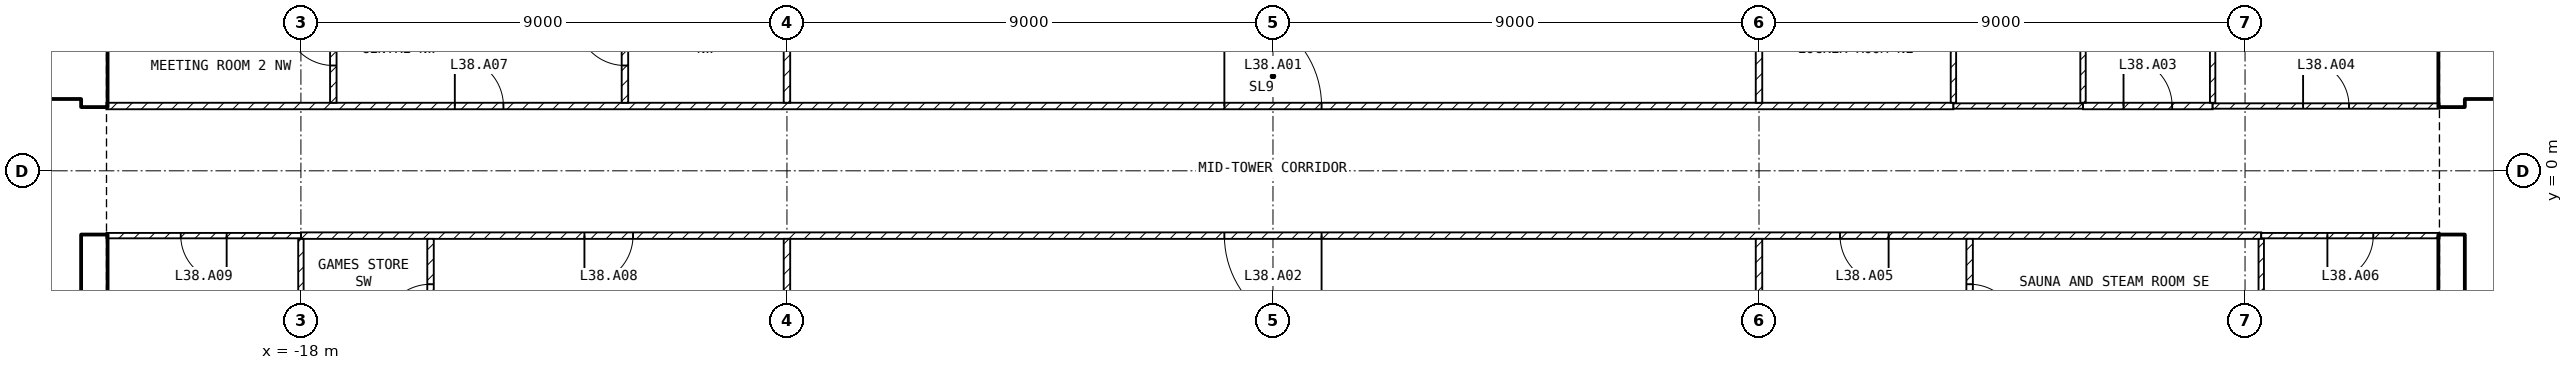
"""IFC4 building model, lengths in metres.
Left out: names, types, materials, properties, quantities, classifications, styles, units other than length and angle.
Written with IfcOpenShell. Run it as: python <this file> out.ifc"""

import sys

from ifc_helpers import new_model, si_unit, direction, frame, frame_2d, origin, place, context, subcontext, project, spatial, rectangle, extrude, element, fill, save


model = new_model("IFC4")
c1 = context("Model", 3, precision=1e-05, world=origin(), true_north=direction((0.0, 1.0)))
c2 = subcontext(c1, "Body", "Model", "MODEL_VIEW")
j1 = project(units=[si_unit("LENGTHUNIT", "METRE"), si_unit("PLANEANGLEUNIT", "RADIAN")], contexts=[c1])
p1 = place(None, origin())
s1 = spatial("IfcSite", under=j1, at=p1, CompositionType="ELEMENT")
p2 = place(p1, origin())
s2 = spatial("IfcBuilding", under=s1, at=p2, CompositionType="ELEMENT")
p3 = place(p2, frame((0.0, 0.0, 154.9)))
s3 = spatial("IfcBuildingStorey", under=s2, at=p3, CompositionType="ELEMENT", Elevation=154.9)
for number, where, z_axis, x_axis in (
    (1, (21.825, -8.1, 0.0), (0.0, 0.0, 1.0), (0.0, 1.0, 0.0)),
    (2, (21.825, 1.2, 0.0), (0.0, 0.0, 1.0), (0.0, 1.0, 0.0)),
):
    element("IfcWall", number, at=place(p3, frame(where, z_axis=z_axis, x_axis=x_axis)), inside=s3, PredefinedType="SHEAR", context=c2, shape_type="SweptSolid", body=[
        extrude(rectangle(XDim=6.9, YDim=0.45, at=frame_2d((3.45, 0.0))), origin(), (0.0, 0.0, 1.0), 6.75),
    ])
p4 = place(p3, frame((22.05, 1.45, 0.0), z_axis=(0.0, 0.0, 1.0), x_axis=(1.0, 0.0, 0.0)))
e3 = element("IfcWall", 3, at=p4, inside=s3, PredefinedType="SOLIDWALL", context=c2, shape_type="SweptSolid", body=[
    extrude(rectangle(XDim=11.0, YDim=0.2, at=frame_2d((5.5, 0.0))), origin(), (0.0, 0.0, 1.0), 6.75),
])
p5 = place(p4, frame((0.75, 0.0, 0.0)))
e4 = element("IfcOpeningElement", 4, at=p5, cuts=e3, PredefinedType="OPENING", context=c2, shape_type="SweptSolid", body=[
    extrude(rectangle(XDim=1.0, YDim=2.1, at=frame_2d((0.5, 1.05))), frame((0.0, 0.11, 0.0), z_axis=(0.0, -1.0, 0.0), x_axis=(1.0, 0.0, 0.0)), (0.0, 0.0, 1.0), 0.22),
])
p6 = place(p4, frame((3.25, 0.0, 0.0)))
e5 = element("IfcOpeningElement", 5, at=p6, cuts=e3, PredefinedType="OPENING", context=c2, shape_type="SweptSolid", body=[
    extrude(rectangle(XDim=1.0, YDim=2.1, at=frame_2d((0.5, 1.05))), frame((0.0, 0.11, 0.0), z_axis=(0.0, -1.0, 0.0), x_axis=(1.0, 0.0, 0.0)), (0.0, 0.0, 1.0), 0.22),
])
p7 = place(p4, frame((9.075, 0.0, 0.0)))
e6 = element("IfcOpeningElement", 6, at=p7, cuts=e3, PredefinedType="OPENING", context=c2, shape_type="SweptSolid", body=[
    extrude(rectangle(XDim=0.9, YDim=2.1, at=frame_2d((0.45, 1.05))), frame((0.0, 0.11, 0.0), z_axis=(0.0, -1.0, 0.0), x_axis=(1.0, 0.0, 0.0)), (0.0, 0.0, 1.0), 0.22),
])
for number, where, z_axis, x_axis in (
    (7, (-21.825, -8.1, 0.0), (0.0, 0.0, 1.0), (0.0, 1.0, 0.0)),
    (8, (-21.825, 1.2, 0.0), (0.0, 0.0, 1.0), (0.0, 1.0, 0.0)),
):
    element("IfcWall", number, at=place(p3, frame(where, z_axis=z_axis, x_axis=x_axis)), inside=s3, PredefinedType="SHEAR", context=c2, shape_type="SweptSolid", body=[
        extrude(rectangle(XDim=6.9, YDim=0.45, at=frame_2d((3.45, 0.0))), origin(), (0.0, 0.0, 1.0), 6.75),
    ])
p8 = place(p3, frame((-33.05, 1.45, 0.0), z_axis=(0.0, 0.0, 1.0), x_axis=(1.0, 0.0, 0.0)))
e9 = element("IfcWall", 9, at=p8, inside=s3, PredefinedType="SOLIDWALL", context=c2, shape_type="SweptSolid", body=[
    extrude(rectangle(XDim=11.0, YDim=0.2, at=frame_2d((5.5, 0.0))), origin(), (0.0, 0.0, 1.0), 6.75),
])
p9 = place(p8, frame((9.25, 0.0, 0.0)))
e10 = element("IfcOpeningElement", 10, at=p9, cuts=e9, PredefinedType="OPENING", context=c2, shape_type="SweptSolid", body=[
    extrude(rectangle(XDim=1.0, YDim=2.1, at=frame_2d((0.5, 1.05))), frame((0.0, 0.11, 0.0), z_axis=(0.0, -1.0, 0.0), x_axis=(1.0, 0.0, 0.0)), (0.0, 0.0, 1.0), 0.22),
])
p10 = place(p8, frame((6.75, 0.0, 0.0)))
e11 = element("IfcOpeningElement", 11, at=p10, cuts=e9, PredefinedType="OPENING", context=c2, shape_type="SweptSolid", body=[
    extrude(rectangle(XDim=1.0, YDim=2.1, at=frame_2d((0.5, 1.05))), frame((0.0, 0.11, 0.0), z_axis=(0.0, -1.0, 0.0), x_axis=(1.0, 0.0, 0.0)), (0.0, 0.0, 1.0), 0.22),
])
p11 = place(p8, frame((1.025, 0.0, 0.0)))
e12 = element("IfcOpeningElement", 12, at=p11, cuts=e9, PredefinedType="OPENING", context=c2, shape_type="SweptSolid", body=[
    extrude(rectangle(XDim=0.9, YDim=2.1, at=frame_2d((0.45, 1.05))), frame((0.0, 0.11, 0.0), z_axis=(0.0, -1.0, 0.0), x_axis=(1.0, 0.0, 0.0)), (0.0, 0.0, 1.0), 0.22),
])
p12 = place(p3, frame((-21.6, 1.2, 0.0), z_axis=(0.0, 0.0, 1.0), x_axis=(1.0, 0.0, 0.0)))
e13 = element("IfcWall", 13, at=p12, inside=s3, PredefinedType="PARTITIONING", context=c2, shape_type="SweptSolid", body=[
    extrude(rectangle(XDim=34.2, YDim=0.12, at=frame_2d((17.1, 0.0))), origin(), (0.0, 0.0, 1.0), 6.75),
])
p13 = place(p12, frame((20.7, 0.0, 0.0)))
e14 = element("IfcOpeningElement", 14, at=p13, cuts=e13, PredefinedType="OPENING", context=c2, shape_type="SweptSolid", body=[
    extrude(rectangle(XDim=1.8, YDim=2.1, at=frame_2d((0.9, 1.05))), frame((0.0, 0.07, 0.0), z_axis=(0.0, -1.0, 0.0), x_axis=(1.0, 0.0, 0.0)), (0.0, 0.0, 1.0), 0.14),
])
p14 = place(p12, frame((6.45, 0.0, 0.0)))
e15 = element("IfcOpeningElement", 15, at=p14, cuts=e13, PredefinedType="OPENING", context=c2, shape_type="SweptSolid", body=[
    extrude(rectangle(XDim=0.9, YDim=2.1, at=frame_2d((0.45, 1.05))), frame((0.0, 0.07, 0.0), z_axis=(0.0, -1.0, 0.0), x_axis=(1.0, 0.0, 0.0)), (0.0, 0.0, 1.0), 0.14),
])
p15 = place(p3, frame((18.3, -1.2, 0.0), z_axis=(0.0, 0.0, 1.0), x_axis=(-1.0, 0.0, 0.0)))
e16 = element("IfcWall", 16, at=p15, inside=s3, PredefinedType="PARTITIONING", context=c2, shape_type="SweptSolid", body=[
    extrude(rectangle(XDim=36.3, YDim=0.12, at=frame_2d((18.15, 0.0))), origin(), (0.0, 0.0, 1.0), 6.75),
])
p16 = place(p15, frame((17.4, 0.0, 0.0)))
e17 = element("IfcOpeningElement", 17, at=p16, cuts=e16, PredefinedType="OPENING", context=c2, shape_type="SweptSolid", body=[
    extrude(rectangle(XDim=1.8, YDim=2.1, at=frame_2d((0.9, 1.05))), frame((0.0, 0.07, 0.0), z_axis=(0.0, -1.0, 0.0), x_axis=(1.0, 0.0, 0.0)), (0.0, 0.0, 1.0), 0.14),
])
p17 = place(p15, frame((6.9, 0.0, 0.0)))
e18 = element("IfcOpeningElement", 18, at=p17, cuts=e16, PredefinedType="OPENING", context=c2, shape_type="SweptSolid", body=[
    extrude(rectangle(XDim=0.9, YDim=2.1, at=frame_2d((0.45, 1.05))), frame((0.0, 0.07, 0.0), z_axis=(0.0, -1.0, 0.0), x_axis=(1.0, 0.0, 0.0)), (0.0, 0.0, 1.0), 0.14),
])
p18 = place(p15, frame((30.15, 0.0, 0.0)))
e19 = element("IfcOpeningElement", 19, at=p18, cuts=e16, PredefinedType="OPENING", context=c2, shape_type="SweptSolid", body=[
    extrude(rectangle(XDim=0.9, YDim=2.1, at=frame_2d((0.45, 1.05))), frame((0.0, 0.07, 0.0), z_axis=(0.0, -1.0, 0.0), x_axis=(1.0, 0.0, 0.0)), (0.0, 0.0, 1.0), 0.14),
])
p19 = place(p3, frame((12.6, 1.2, 0.0), z_axis=(0.0, 0.0, 1.0), x_axis=(1.0, 0.0, 0.0)))
e20 = element("IfcWall", 20, at=p19, inside=s3, PredefinedType="PARTITIONING", context=c2, shape_type="SweptSolid", body=[
    extrude(rectangle(XDim=2.4, YDim=0.1, at=frame_2d((1.2, 0.0))), origin(), (0.0, 0.0, 1.0), 6.75),
])
p20 = place(p3, frame((15.0, 1.2, 0.0), z_axis=(0.0, 0.0, 1.0), x_axis=(1.0, 0.0, 0.0)))
e21 = element("IfcWall", 21, at=p20, inside=s3, PredefinedType="PARTITIONING", context=c2, shape_type="SweptSolid", body=[
    extrude(rectangle(XDim=2.4, YDim=0.12, at=frame_2d((1.2, 0.0))), origin(), (0.0, 0.0, 1.0), 6.75),
])
p21 = place(p20, frame((0.75, 0.0, 0.0)))
e22 = element("IfcOpeningElement", 22, at=p21, cuts=e21, PredefinedType="OPENING", context=c2, shape_type="SweptSolid", body=[
    extrude(rectangle(XDim=0.9, YDim=2.1, at=frame_2d((0.45, 1.05))), frame((0.0, 0.07, 0.0), z_axis=(0.0, -1.0, 0.0), x_axis=(1.0, 0.0, 0.0)), (0.0, 0.0, 1.0), 0.14),
])
p22 = place(p3, frame((17.4, 1.2, 0.0), z_axis=(0.0, 0.0, 1.0), x_axis=(1.0, 0.0, 0.0)))
e23 = element("IfcWall", 23, at=p22, inside=s3, PredefinedType="PARTITIONING", context=c2, shape_type="SweptSolid", body=[
    extrude(rectangle(XDim=4.2, YDim=0.1, at=frame_2d((2.1, 0.0))), origin(), (0.0, 0.0, 1.0), 6.75),
])
p23 = place(p22, frame((1.675, 0.0, 0.0)))
e24 = element("IfcOpeningElement", 24, at=p23, cuts=e23, PredefinedType="OPENING", context=c2, shape_type="SweptSolid", body=[
    extrude(rectangle(XDim=0.85, YDim=2.1, at=frame_2d((0.425, 1.05))), frame((0.0, 0.06, 0.0), z_axis=(0.0, -1.0, 0.0), x_axis=(1.0, 0.0, 0.0)), (0.0, 0.0, 1.0), 0.12),
])
p24 = place(p3, frame((21.6, -1.2, 0.0), z_axis=(0.0, 0.0, 1.0), x_axis=(-1.0, 0.0, 0.0)))
e25 = element("IfcWall", 25, at=p24, inside=s3, PredefinedType="PARTITIONING", context=c2, shape_type="SweptSolid", body=[
    extrude(rectangle(XDim=3.3, YDim=0.1, at=frame_2d((1.65, 0.0))), origin(), (0.0, 0.0, 1.0), 6.75),
])
p25 = place(p24, frame((1.225, 0.0, 0.0)))
e26 = element("IfcOpeningElement", 26, at=p25, cuts=e25, PredefinedType="OPENING", context=c2, shape_type="SweptSolid", body=[
    extrude(rectangle(XDim=0.85, YDim=2.1, at=frame_2d((0.425, 1.05))), frame((0.0, 0.06, 0.0), z_axis=(0.0, -1.0, 0.0), x_axis=(1.0, 0.0, 0.0)), (0.0, 0.0, 1.0), 0.12),
])
p26 = place(p3, frame((-18.0, -1.2, 0.0), z_axis=(0.0, 0.0, 1.0), x_axis=(-1.0, 0.0, 0.0)))
e27 = element("IfcWall", 27, at=p26, inside=s3, PredefinedType="PARTITIONING", context=c2, shape_type="SweptSolid", body=[
    extrude(rectangle(XDim=3.6, YDim=0.1, at=frame_2d((1.8, 0.0))), origin(), (0.0, 0.0, 1.0), 6.75),
])
p27 = place(p26, frame((1.375, 0.0, 0.0)))
e28 = element("IfcOpeningElement", 28, at=p27, cuts=e27, PredefinedType="OPENING", context=c2, shape_type="SweptSolid", body=[
    extrude(rectangle(XDim=0.85, YDim=2.1, at=frame_2d((0.425, 1.05))), frame((0.0, 0.06, 0.0), z_axis=(0.0, -1.0, 0.0), x_axis=(1.0, 0.0, 0.0)), (0.0, 0.0, 1.0), 0.12),
])
p28 = place(p3, frame((9.0, 8.92, 0.0), z_axis=(0.0, 0.0, 1.0), x_axis=(0.0, -1.0, 0.0)))
e29 = element("IfcWall", 29, at=p28, inside=s3, PredefinedType="PARTITIONING", context=c2, shape_type="SweptSolid", body=[
    extrude(rectangle(XDim=7.66, YDim=0.12, at=frame_2d((3.83, 0.0))), origin(), (0.0, 0.0, 1.0), 6.75),
])
p29 = place(p28, frame((5.74, 0.0, 0.0)))
e30 = element("IfcOpeningElement", 30, at=p29, cuts=e29, PredefinedType="OPENING", context=c2, shape_type="SweptSolid", body=[
    extrude(rectangle(XDim=0.9, YDim=2.1, at=frame_2d((0.45, 1.05))), frame((0.0, 0.07, 0.0), z_axis=(0.0, -1.0, 0.0), x_axis=(1.0, 0.0, 0.0)), (0.0, 0.0, 1.0), 0.14),
])
for number, where, z_axis, x_axis in (
    (31, (-9.0, 1.26, 0.0), (0.0, 0.0, 1.0), (0.0, 1.0, 0.0)),
    (32, (9.0, -1.26, 0.0), (0.0, 0.0, 1.0), (0.0, -1.0, 0.0)),
    (33, (-9.0, -8.92, 0.0), (0.0, 0.0, 1.0), (0.0, 1.0, 0.0)),
):
    element("IfcWall", number, at=place(p3, frame(where, z_axis=z_axis, x_axis=x_axis)), inside=s3, PredefinedType="PARTITIONING", context=c2, shape_type="SweptSolid", body=[
        extrude(rectangle(XDim=7.66, YDim=0.12, at=frame_2d((3.83, 0.0))), origin(), (0.0, 0.0, 1.0), 6.75),
    ])
p30 = place(p3, frame((12.6, 4.14, 0.0), z_axis=(0.0, 0.0, 1.0), x_axis=(0.0, -1.0, 0.0)))
e34 = element("IfcWall", 34, at=p30, inside=s3, PredefinedType="PARTITIONING", context=c2, shape_type="SweptSolid", body=[
    extrude(rectangle(XDim=2.88, YDim=0.1, at=frame_2d((1.44, 0.0))), origin(), (0.0, 0.0, 1.0), 6.75),
])
p31 = place(p3, frame((15.0, 4.14, 0.0), z_axis=(0.0, 0.0, 1.0), x_axis=(0.0, -1.0, 0.0)))
e35 = element("IfcWall", 35, at=p31, inside=s3, PredefinedType="PARTITIONING", context=c2, shape_type="SweptSolid", body=[
    extrude(rectangle(XDim=2.88, YDim=0.1, at=frame_2d((1.44, 0.0))), origin(), (0.0, 0.0, 1.0), 6.75),
])
p32 = place(p31, frame((1.015, 0.0, 0.0)))
e36 = element("IfcOpeningElement", 36, at=p32, cuts=e35, PredefinedType="OPENING", context=c2, shape_type="SweptSolid", body=[
    extrude(rectangle(XDim=0.85, YDim=2.1, at=frame_2d((0.425, 1.05))), frame((0.0, 0.06, 0.0), z_axis=(0.0, -1.0, 0.0), x_axis=(1.0, 0.0, 0.0)), (0.0, 0.0, 1.0), 0.12),
])
p33 = place(p3, frame((17.4, 4.14, 0.0), z_axis=(0.0, 0.0, 1.0), x_axis=(0.0, -1.0, 0.0)))
e37 = element("IfcWall", 37, at=p33, inside=s3, PredefinedType="PARTITIONING", context=c2, shape_type="SweptSolid", body=[
    extrude(rectangle(XDim=2.88, YDim=0.1, at=frame_2d((1.44, 0.0))), origin(), (0.0, 0.0, 1.0), 6.75),
])
p34 = place(p3, frame((12.9, -1.26, 0.0), z_axis=(0.0, 0.0, 1.0), x_axis=(0.0, -1.0, 0.0)))
e38 = element("IfcWall", 38, at=p34, inside=s3, PredefinedType="PARTITIONING", context=c2, shape_type="SweptSolid", body=[
    extrude(rectangle(XDim=2.58, YDim=0.12, at=frame_2d((1.29, 0.0))), origin(), (0.0, 0.0, 1.0), 6.217),
])
p35 = place(p34, frame((0.84, 0.0, 0.0)))
e39 = element("IfcOpeningElement", 39, at=p35, cuts=e38, PredefinedType="OPENING", context=c2, shape_type="SweptSolid", body=[
    extrude(rectangle(XDim=0.9, YDim=2.1, at=frame_2d((0.45, 1.05))), frame((0.0, 0.07, 0.0), z_axis=(0.0, -1.0, 0.0), x_axis=(1.0, 0.0, 0.0)), (0.0, 0.0, 1.0), 0.14),
])
p36 = place(p3, frame((18.3, -1.26, 0.0), z_axis=(0.0, 0.0, 1.0), x_axis=(0.0, -1.0, 0.0)))
e40 = element("IfcWall", 40, at=p36, inside=s3, PredefinedType="PARTITIONING", context=c2, shape_type="SweptSolid", body=[
    extrude(rectangle(XDim=2.58, YDim=0.1, at=frame_2d((1.29, 0.0))), origin(), (0.0, 0.0, 1.0), 6.75),
])
p37 = place(p3, frame((-12.0, 1.26, 0.0), z_axis=(0.0, 0.0, 1.0), x_axis=(0.0, 1.0, 0.0)))
e41 = element("IfcWall", 41, at=p37, inside=s3, PredefinedType="PARTITIONING", context=c2, shape_type="SweptSolid", body=[
    extrude(rectangle(XDim=2.28, YDim=0.12, at=frame_2d((1.14, 0.0))), origin(), (0.0, 0.0, 1.0), 6.75),
])
p38 = place(p37, frame((0.69, 0.0, 0.0)))
e42 = element("IfcOpeningElement", 42, at=p38, cuts=e41, PredefinedType="OPENING", context=c2, shape_type="SweptSolid", body=[
    extrude(rectangle(XDim=0.9, YDim=2.1, at=frame_2d((0.45, 1.05))), frame((0.0, 0.07, 0.0), z_axis=(0.0, -1.0, 0.0), x_axis=(1.0, 0.0, 0.0)), (0.0, 0.0, 1.0), 0.14),
])
p39 = place(p3, frame((-17.4, 1.26, 0.0), z_axis=(0.0, 0.0, 1.0), x_axis=(0.0, 1.0, 0.0)))
e43 = element("IfcWall", 43, at=p39, inside=s3, PredefinedType="PARTITIONING", context=c2, shape_type="SweptSolid", body=[
    extrude(rectangle(XDim=2.28, YDim=0.12, at=frame_2d((1.14, 0.0))), origin(), (0.0, 0.0, 1.0), 6.75),
])
p40 = place(p39, frame((0.69, 0.0, 0.0)))
e44 = element("IfcOpeningElement", 44, at=p40, cuts=e43, PredefinedType="OPENING", context=c2, shape_type="SweptSolid", body=[
    extrude(rectangle(XDim=0.9, YDim=2.1, at=frame_2d((0.45, 1.05))), frame((0.0, 0.07, 0.0), z_axis=(0.0, -1.0, 0.0), x_axis=(1.0, 0.0, 0.0)), (0.0, 0.0, 1.0), 0.14),
])
p41 = place(p3, frame((-15.6, -3.84, 0.0), z_axis=(0.0, 0.0, 1.0), x_axis=(0.0, 1.0, 0.0)))
e45 = element("IfcWall", 45, at=p41, inside=s3, PredefinedType="PARTITIONING", context=c2, shape_type="SweptSolid", body=[
    extrude(rectangle(XDim=2.58, YDim=0.12, at=frame_2d((1.29, 0.0))), origin(), (0.0, 0.0, 1.0), 6.75),
])
p42 = place(p41, frame((0.84, 0.0, 0.0)))
e46 = element("IfcOpeningElement", 46, at=p42, cuts=e45, PredefinedType="OPENING", context=c2, shape_type="SweptSolid", body=[
    extrude(rectangle(XDim=0.9, YDim=2.1, at=frame_2d((0.45, 1.05))), frame((0.0, 0.07, 0.0), z_axis=(0.0, -1.0, 0.0), x_axis=(1.0, 0.0, 0.0)), (0.0, 0.0, 1.0), 0.14),
])
p43 = place(p3, frame((-18.0, -3.9, 0.0), z_axis=(0.0, 0.0, 1.0), x_axis=(0.0, 1.0, 0.0)))
e47 = element("IfcWall", 47, at=p43, inside=s3, PredefinedType="PARTITIONING", context=c2, shape_type="SweptSolid", body=[
    extrude(rectangle(XDim=2.64, YDim=0.1, at=frame_2d((1.32, 0.0))), origin(), (0.0, 0.0, 1.0), 5.914),
])
p44 = place(p13, origin())
e48 = element("IfcDoor", 48, at=p44, inside=s3, OperationType="SINGLE_SWING_LEFT", PredefinedType="DOOR", context=c2, shape_type="SweptSolid", body=[
    extrude(rectangle(XDim=1.8, YDim=2.1, at=frame_2d((0.9, 1.05))), frame((0.0, 0.025, 0.0), z_axis=(0.0, -1.0, 0.0), x_axis=(1.0, 0.0, 0.0)), (0.0, 0.0, 1.0), 0.05),
])
fill(e14, e48)
p45 = place(p16, origin())
e49 = element("IfcDoor", 49, at=p45, inside=s3, OperationType="SINGLE_SWING_LEFT", PredefinedType="DOOR", context=c2, shape_type="SweptSolid", body=[
    extrude(rectangle(XDim=1.8, YDim=2.1, at=frame_2d((0.9, 1.05))), frame((0.0, 0.025, 0.0), z_axis=(0.0, -1.0, 0.0), x_axis=(1.0, 0.0, 0.0)), (0.0, 0.0, 1.0), 0.05),
])
fill(e17, e49)
p46 = place(p21, origin())
e50 = element("IfcDoor", 50, at=p46, inside=s3, OperationType="SINGLE_SWING_LEFT", PredefinedType="DOOR", context=c2, shape_type="SweptSolid", body=[
    extrude(rectangle(XDim=0.9, YDim=2.1, at=frame_2d((0.45, 1.05))), frame((0.0, 0.025, 0.0), z_axis=(0.0, -1.0, 0.0), x_axis=(1.0, 0.0, 0.0)), (0.0, 0.0, 1.0), 0.05),
])
fill(e22, e50)
p47 = place(p23, origin())
e51 = element("IfcDoor", 51, at=p47, inside=s3, OperationType="SINGLE_SWING_LEFT", PredefinedType="DOOR", context=c2, shape_type="SweptSolid", body=[
    extrude(rectangle(XDim=0.85, YDim=2.1, at=frame_2d((0.425, 1.05))), frame((0.0, 0.025, 0.0), z_axis=(0.0, -1.0, 0.0), x_axis=(1.0, 0.0, 0.0)), (0.0, 0.0, 1.0), 0.05),
])
fill(e24, e51)
p48 = place(p17, origin())
e52 = element("IfcDoor", 52, at=p48, inside=s3, OperationType="SINGLE_SWING_LEFT", PredefinedType="DOOR", context=c2, shape_type="SweptSolid", body=[
    extrude(rectangle(XDim=0.9, YDim=2.1, at=frame_2d((0.45, 1.05))), frame((0.0, 0.025, 0.0), z_axis=(0.0, -1.0, 0.0), x_axis=(1.0, 0.0, 0.0)), (0.0, 0.0, 1.0), 0.05),
])
fill(e18, e52)
p49 = place(p25, origin())
e53 = element("IfcDoor", 53, at=p49, inside=s3, OperationType="SINGLE_SWING_RIGHT", PredefinedType="DOOR", context=c2, shape_type="SweptSolid", body=[
    extrude(rectangle(XDim=0.85, YDim=2.1, at=frame_2d((0.425, 1.05))), frame((0.0, 0.025, 0.0), z_axis=(0.0, -1.0, 0.0), x_axis=(1.0, 0.0, 0.0)), (0.0, 0.0, 1.0), 0.05),
])
fill(e26, e53)
p50 = place(p14, origin())
e54 = element("IfcDoor", 54, at=p50, inside=s3, OperationType="SINGLE_SWING_LEFT", PredefinedType="DOOR", context=c2, shape_type="SweptSolid", body=[
    extrude(rectangle(XDim=0.9, YDim=2.1, at=frame_2d((0.45, 1.05))), frame((0.0, 0.025, 0.0), z_axis=(0.0, -1.0, 0.0), x_axis=(1.0, 0.0, 0.0)), (0.0, 0.0, 1.0), 0.05),
])
fill(e15, e54)
p51 = place(p18, origin())
e55 = element("IfcDoor", 55, at=p51, inside=s3, OperationType="SINGLE_SWING_RIGHT", PredefinedType="DOOR", context=c2, shape_type="SweptSolid", body=[
    extrude(rectangle(XDim=0.9, YDim=2.1, at=frame_2d((0.45, 1.05))), frame((0.0, 0.025, 0.0), z_axis=(0.0, -1.0, 0.0), x_axis=(1.0, 0.0, 0.0)), (0.0, 0.0, 1.0), 0.05),
])
fill(e19, e55)
p52 = place(p27, origin())
e56 = element("IfcDoor", 56, at=p52, inside=s3, OperationType="SINGLE_SWING_LEFT", PredefinedType="DOOR", context=c2, shape_type="SweptSolid", body=[
    extrude(rectangle(XDim=0.85, YDim=2.1, at=frame_2d((0.425, 1.05))), frame((0.0, 0.025, 0.0), z_axis=(0.0, -1.0, 0.0), x_axis=(1.0, 0.0, 0.0)), (0.0, 0.0, 1.0), 0.05),
])
fill(e28, e56)
p53 = place(p42, origin())
e57 = element("IfcDoor", 57, at=p53, inside=s3, OperationType="SINGLE_SWING_LEFT", PredefinedType="DOOR", context=c2, shape_type="SweptSolid", body=[
    extrude(rectangle(XDim=0.9, YDim=2.1, at=frame_2d((0.45, 1.05))), frame((0.0, 0.025, 0.0), z_axis=(0.0, -1.0, 0.0), x_axis=(1.0, 0.0, 0.0)), (0.0, 0.0, 1.0), 0.05),
])
fill(e46, e57)
p54 = place(p38, origin())
e58 = element("IfcDoor", 58, at=p54, inside=s3, OperationType="SINGLE_SWING_RIGHT", PredefinedType="DOOR", context=c2, shape_type="SweptSolid", body=[
    extrude(rectangle(XDim=0.9, YDim=2.1, at=frame_2d((0.45, 1.05))), frame((0.0, 0.025, 0.0), z_axis=(0.0, -1.0, 0.0), x_axis=(1.0, 0.0, 0.0)), (0.0, 0.0, 1.0), 0.05),
])
fill(e42, e58)
p55 = place(p40, origin())
e59 = element("IfcDoor", 59, at=p55, inside=s3, OperationType="SINGLE_SWING_RIGHT", PredefinedType="DOOR", context=c2, shape_type="SweptSolid", body=[
    extrude(rectangle(XDim=0.9, YDim=2.1, at=frame_2d((0.45, 1.05))), frame((0.0, 0.025, 0.0), z_axis=(0.0, -1.0, 0.0), x_axis=(1.0, 0.0, 0.0)), (0.0, 0.0, 1.0), 0.05),
])
fill(e44, e59)
p56 = place(p35, origin())
e60 = element("IfcDoor", 60, at=p56, inside=s3, OperationType="SINGLE_SWING_RIGHT", PredefinedType="DOOR", context=c2, shape_type="SweptSolid", body=[
    extrude(rectangle(XDim=0.9, YDim=2.1, at=frame_2d((0.45, 1.05))), frame((0.0, 0.025, 0.0), z_axis=(0.0, -1.0, 0.0), x_axis=(1.0, 0.0, 0.0)), (0.0, 0.0, 1.0), 0.05),
])
fill(e39, e60)
save(model, sys.argv[1])
